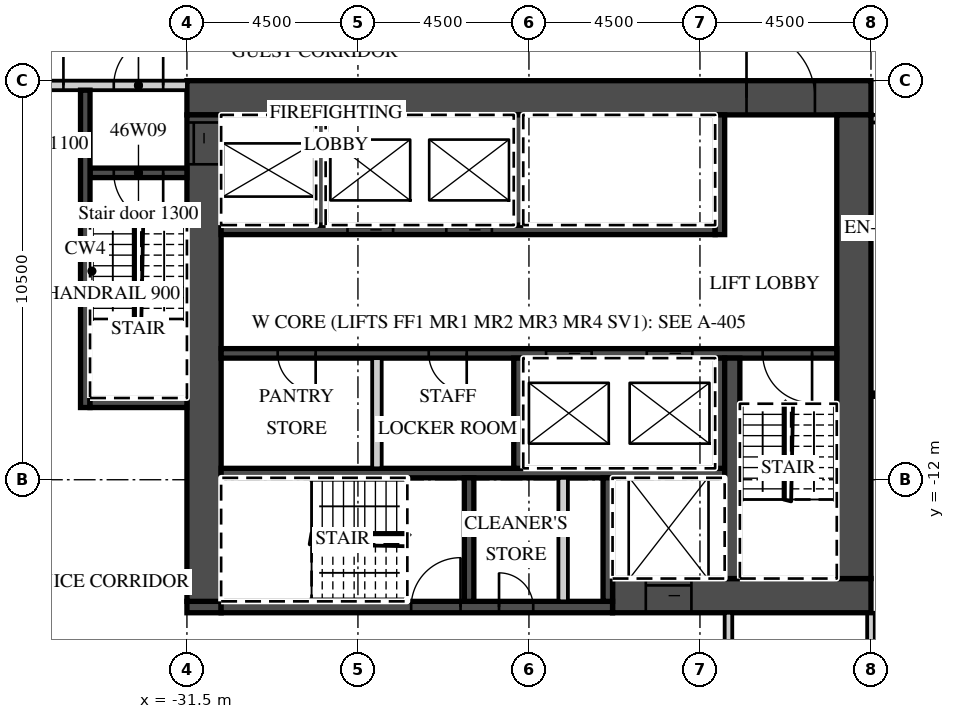
"""IFC4 building model, lengths in metres.
Left out: names, types, materials, properties, quantities, classifications, styles, units other than length and angle.
Written with IfcOpenShell. Run it as: python <this file> out.ifc"""

import sys

from ifc_helpers import new_model, si_unit, direction, frame, frame_2d, origin, place, context, subcontext, project, spatial, rectangle, extrude, element, fill, save


model = new_model("IFC4")
c1 = context("Model", 3, precision=1e-05, world=origin(), true_north=direction((0.0, 1.0)))
c2 = subcontext(c1, "Body", "Model", "MODEL_VIEW")
j1 = project(units=[si_unit("LENGTHUNIT", "METRE"), si_unit("PLANEANGLEUNIT", "RADIAN")], contexts=[c1])
p1 = place(None, origin())
s1 = spatial("IfcSite", under=j1, at=p1, CompositionType="ELEMENT")
p2 = place(p1, origin())
s2 = spatial("IfcBuilding", under=s1, at=p2, CompositionType="ELEMENT")
p3 = place(p2, frame((0.0, 0.0, 193.3)))
s3 = spatial("IfcBuildingStorey", under=s2, at=p3, CompositionType="ELEMENT", Elevation=193.3)
p4 = place(p3, frame((-13.5, -22.3, 0.0), z_axis=(0.0, 0.0, 1.0), x_axis=(0.0, 1.0, 0.0)))
e1 = element("IfcWall", 1, at=p4, inside=s3, PredefinedType="PARTITIONING", context=c2, shape_type="SweptSolid", body=[
    extrude(rectangle(XDim=6.8, YDim=0.2, at=frame_2d((3.4, 0.0))), origin(), (0.0, 0.0, 1.0), 3.02),
])
p5 = place(p3, frame((-13.5, -2.5, 0.0), z_axis=(0.0, 0.0, 1.0), x_axis=(1.0, 0.0, 0.0)))
e2 = element("IfcWall", 2, at=p5, inside=s3, PredefinedType="PARTITIONING", context=c2, shape_type="SweptSolid", body=[
    extrude(rectangle(XDim=27.0, YDim=0.2, at=frame_2d((13.5, 0.0))), origin(), (0.0, 0.0, 1.0), 3.02),
])
p6 = place(p5, frame((2.925, 0.0, 0.0)))
e3 = element("IfcOpeningElement", 3, at=p6, cuts=e2, PredefinedType="OPENING", context=c2, shape_type="SweptSolid", body=[
    extrude(rectangle(XDim=1.0, YDim=2.1, at=frame_2d((0.5, 1.05))), frame((0.0, 0.11, 0.0), z_axis=(0.0, -1.0, 0.0), x_axis=(1.0, 0.0, 0.0)), (0.0, 0.0, 1.0), 0.22),
])
p7 = place(p5, frame((5.075, 0.0, 0.0)))
e4 = element("IfcOpeningElement", 4, at=p7, cuts=e2, PredefinedType="OPENING", context=c2, shape_type="SweptSolid", body=[
    extrude(rectangle(XDim=1.0, YDim=2.1, at=frame_2d((0.5, 1.05))), frame((0.0, 0.11, 0.0), z_axis=(0.0, -1.0, 0.0), x_axis=(1.0, 0.0, 0.0)), (0.0, 0.0, 1.0), 0.22),
])
p8 = place(p5, frame((11.925, 0.0, 0.0)))
e5 = element("IfcOpeningElement", 5, at=p8, cuts=e2, PredefinedType="OPENING", context=c2, shape_type="SweptSolid", body=[
    extrude(rectangle(XDim=1.0, YDim=2.1, at=frame_2d((0.5, 1.05))), frame((0.0, 0.11, 0.0), z_axis=(0.0, -1.0, 0.0), x_axis=(1.0, 0.0, 0.0)), (0.0, 0.0, 1.0), 0.22),
])
p9 = place(p5, frame((15.938, 0.0, 0.0)))
e6 = element("IfcOpeningElement", 6, at=p9, cuts=e2, PredefinedType="OPENING", context=c2, shape_type="SweptSolid", body=[
    extrude(rectangle(XDim=1.2, YDim=2.1, at=frame_2d((0.6, 1.05))), frame((0.0, 0.11, 0.0), z_axis=(0.0, -1.0, 0.0), x_axis=(1.0, 0.0, 0.0)), (0.0, 0.0, 1.0), 0.22),
])
p10 = place(p5, frame((25.425, 0.0, 0.0)))
e7 = element("IfcOpeningElement", 7, at=p10, cuts=e2, PredefinedType="OPENING", context=c2, shape_type="SweptSolid", body=[
    extrude(rectangle(XDim=1.0, YDim=2.1, at=frame_2d((0.5, 1.05))), frame((0.0, 0.11, 0.0), z_axis=(0.0, -1.0, 0.0), x_axis=(1.0, 0.0, 0.0)), (0.0, 0.0, 1.0), 0.22),
])
p11 = place(p3, frame((-31.5, -1.95, 0.0), z_axis=(0.0, 0.0, 1.0), x_axis=(1.0, 0.0, 0.0)))
e8 = element("IfcWall", 8, at=p11, inside=s3, PredefinedType="SHEAR", context=c2, shape_type="SweptSolid", body=[
    extrude(rectangle(XDim=18.0, YDim=0.9, at=frame_2d((9.0, 0.0))), origin(), (0.0, 0.0, 1.0), 3.02),
])
p12 = place(p11, frame((14.725, 0.0, 0.0)))
e9 = element("IfcOpeningElement", 9, at=p12, cuts=e8, PredefinedType="OPENING", context=c2, shape_type="SweptSolid", body=[
    extrude(rectangle(XDim=1.8, YDim=2.1, at=frame_2d((0.9, 1.05))), frame((0.0, 0.46, 0.0), z_axis=(0.0, -1.0, 0.0), x_axis=(1.0, 0.0, 0.0)), (0.0, 0.0, 1.0), 0.92),
])
p13 = place(p3, frame((-20.3, -15.05, 0.0), z_axis=(0.0, 0.0, 1.0), x_axis=(1.0, 0.0, 0.0)))
e10 = element("IfcWall", 10, at=p13, inside=s3, PredefinedType="SHEAR", context=c2, shape_type="SweptSolid", body=[
    extrude(rectangle(XDim=6.8, YDim=0.9, at=frame_2d((3.4, 0.0))), origin(), (0.0, 0.0, 1.0), 3.02),
])
p14 = place(p13, frame((0.875, 0.0, 0.0)))
e11 = element("IfcOpeningElement", 11, at=p14, cuts=e10, PredefinedType="OPENING", context=c2, shape_type="SweptSolid", body=[
    extrude(rectangle(XDim=1.2, YDim=2.1, at=frame_2d((0.6, 1.05))), frame((0.0, 0.46, 0.0), z_axis=(0.0, -1.0, 0.0), x_axis=(1.0, 0.0, 0.0)), (0.0, 0.0, 1.0), 0.92),
])
p15 = place(p3, frame((-31.5, -15.35, 0.0), z_axis=(0.0, 0.0, 1.0), x_axis=(1.0, 0.0, 0.0)))
e12 = element("IfcWall", 12, at=p15, inside=s3, PredefinedType="SHEAR", context=c2, shape_type="SweptSolid", body=[
    extrude(rectangle(XDim=0.9, YDim=0.3, at=frame_2d((0.45, 0.0))), origin(), (0.0, 0.0, 1.0), 3.02),
])
p16 = place(p3, frame((-30.6, -15.35, 0.0), z_axis=(0.0, 0.0, 1.0), x_axis=(1.0, 0.0, 0.0)))
e13 = element("IfcWall", 13, at=p16, inside=s3, PredefinedType="SHEAR", context=c2, shape_type="SweptSolid", body=[
    extrude(rectangle(XDim=10.3, YDim=0.3, at=frame_2d((5.15, 0.0))), origin(), (0.0, 0.0, 1.0), 3.02),
])
p17 = place(p16, frame((5.0, 0.0, 0.0)))
e14 = element("IfcOpeningElement", 14, at=p17, cuts=e13, PredefinedType="OPENING", context=c2, shape_type="SweptSolid", body=[
    extrude(rectangle(XDim=1.3, YDim=2.1, at=frame_2d((0.65, 1.05))), frame((0.0, 0.16, 0.0), z_axis=(0.0, -1.0, 0.0), x_axis=(1.0, 0.0, 0.0)), (0.0, 0.0, 1.0), 0.32),
])
p18 = place(p16, frame((7.312, 0.0, 0.0)))
e15 = element("IfcOpeningElement", 15, at=p18, cuts=e13, PredefinedType="OPENING", context=c2, shape_type="SweptSolid", body=[
    extrude(rectangle(XDim=0.9, YDim=2.1, at=frame_2d((0.45, 1.05))), frame((0.0, 0.16, 0.0), z_axis=(0.0, -1.0, 0.0), x_axis=(1.0, 0.0, 0.0)), (0.0, 0.0, 1.0), 0.32),
])
p19 = place(p3, frame((-31.05, -15.2, 0.0), z_axis=(0.0, 0.0, 1.0), x_axis=(0.0, 1.0, 0.0)))
e16 = element("IfcWall", 16, at=p19, inside=s3, PredefinedType="SHEAR", context=c2, shape_type="SweptSolid", body=[
    extrude(rectangle(XDim=12.8, YDim=0.9, at=frame_2d((6.4, 0.0))), origin(), (0.0, 0.0, 1.0), 3.02),
])
p20 = place(p19, frame((11.5, 0.0, 0.0)))
e17 = element("IfcOpeningElement", 17, at=p20, cuts=e16, PredefinedType="OPENING", context=c2, shape_type="SweptSolid", body=[
    extrude(rectangle(XDim=1.1, YDim=2.1, at=frame_2d((0.55, 1.05))), frame((0.0, 0.46, 0.0), z_axis=(0.0, -1.0, 0.0), x_axis=(1.0, 0.0, 0.0)), (0.0, 0.0, 1.0), 0.92),
])
p21 = place(p3, frame((-13.95, -14.6, 0.0), z_axis=(0.0, 0.0, 1.0), x_axis=(0.0, 1.0, 0.0)))
e18 = element("IfcWall", 18, at=p21, inside=s3, PredefinedType="SHEAR", context=c2, shape_type="SweptSolid", body=[
    extrude(rectangle(XDim=12.2, YDim=0.9, at=frame_2d((6.1, 0.0))), origin(), (0.0, 0.0, 1.0), 3.02),
])
p22 = place(p3, frame((-30.6, -5.425, 0.0), z_axis=(0.0, 0.0, 1.0), x_axis=(1.0, 0.0, 0.0)))
e19 = element("IfcWall", 19, at=p22, inside=s3, PredefinedType="SHEAR", context=c2, shape_type="SweptSolid", body=[
    extrude(rectangle(XDim=13.0, YDim=0.25, at=frame_2d((6.5, 0.0))), origin(), (0.0, 0.0, 1.0), 3.02),
])
p23 = place(p22, frame((3.325, 0.0, 0.0)))
e20 = element("IfcOpeningElement", 20, at=p23, cuts=e19, PredefinedType="OPENING", context=c2, shape_type="SweptSolid", body=[
    extrude(rectangle(XDim=1.2, YDim=2.1, at=frame_2d((0.6, 1.05))), frame((0.0, 0.135, 0.0), z_axis=(0.0, -1.0, 0.0), x_axis=(1.0, 0.0, 0.0)), (0.0, 0.0, 1.0), 0.27),
])
p24 = place(p22, frame((5.925, 0.0, 0.0)))
e21 = element("IfcOpeningElement", 21, at=p24, cuts=e19, PredefinedType="OPENING", context=c2, shape_type="SweptSolid", body=[
    extrude(rectangle(XDim=1.2, YDim=2.1, at=frame_2d((0.6, 1.05))), frame((0.0, 0.135, 0.0), z_axis=(0.0, -1.0, 0.0), x_axis=(1.0, 0.0, 0.0)), (0.0, 0.0, 1.0), 0.27),
])
p25 = place(p3, frame((-17.475, -5.55, 0.0), z_axis=(0.0, 0.0, 1.0), x_axis=(0.0, 1.0, 0.0)))
e22 = element("IfcWall", 22, at=p25, inside=s3, PredefinedType="SHEAR", context=c2, shape_type="SweptSolid", body=[
    extrude(rectangle(XDim=3.15, YDim=0.25, at=frame_2d((1.575, 0.0))), origin(), (0.0, 0.0, 1.0), 3.02),
])
for number, where, z_axis, x_axis in (
    (23, (-27.975, -5.3, 0.0), (0.0, 0.0, 1.0), (0.0, 1.0, 0.0)),
    (24, (-22.775, -5.3, 0.0), (0.0, 0.0, 1.0), (0.0, 1.0, 0.0)),
):
    element("IfcWall", number, at=place(p3, frame(where, z_axis=z_axis, x_axis=x_axis)), inside=s3, PredefinedType="SHEAR", context=c2, shape_type="SweptSolid", body=[
        extrude(rectangle(XDim=2.9, YDim=0.25, at=frame_2d((1.45, 0.0))), origin(), (0.0, 0.0, 1.0), 3.02),
    ])
p26 = place(p3, frame((-30.6, -8.675, 0.0), z_axis=(0.0, 0.0, 1.0), x_axis=(1.0, 0.0, 0.0)))
e25 = element("IfcWall", 25, at=p26, inside=s3, PredefinedType="SHEAR", context=c2, shape_type="SweptSolid", body=[
    extrude(rectangle(XDim=16.2, YDim=0.25, at=frame_2d((8.1, 0.0))), origin(), (0.0, 0.0, 1.0), 3.02),
])
p27 = place(p26, frame((8.55, 0.0, 0.0)))
e26 = element("IfcOpeningElement", 26, at=p27, cuts=e25, PredefinedType="OPENING", context=c2, shape_type="SweptSolid", body=[
    extrude(rectangle(XDim=1.2, YDim=2.1, at=frame_2d((0.6, 1.05))), frame((0.0, 0.135, 0.0), z_axis=(0.0, -1.0, 0.0), x_axis=(1.0, 0.0, 0.0)), (0.0, 0.0, 1.0), 0.27),
])
p28 = place(p26, frame((11.2, 0.0, 0.0)))
e27 = element("IfcOpeningElement", 27, at=p28, cuts=e25, PredefinedType="OPENING", context=c2, shape_type="SweptSolid", body=[
    extrude(rectangle(XDim=1.2, YDim=2.1, at=frame_2d((0.6, 1.05))), frame((0.0, 0.135, 0.0), z_axis=(0.0, -1.0, 0.0), x_axis=(1.0, 0.0, 0.0)), (0.0, 0.0, 1.0), 0.27),
])
p29 = place(p26, frame((14.25, 0.0, 0.0)))
e28 = element("IfcOpeningElement", 28, at=p29, cuts=e25, PredefinedType="OPENING", context=c2, shape_type="SweptSolid", body=[
    extrude(rectangle(XDim=1.3, YDim=2.1, at=frame_2d((0.65, 1.05))), frame((0.0, 0.135, 0.0), z_axis=(0.0, -1.0, 0.0), x_axis=(1.0, 0.0, 0.0)), (0.0, 0.0, 1.0), 0.27),
])
p30 = place(p26, frame((1.488, 0.0, 0.0)))
e29 = element("IfcOpeningElement", 29, at=p30, cuts=e25, PredefinedType="OPENING", context=c2, shape_type="SweptSolid", body=[
    extrude(rectangle(XDim=1.0, YDim=2.1, at=frame_2d((0.5, 1.05))), frame((0.0, 0.135, 0.0), z_axis=(0.0, -1.0, 0.0), x_axis=(1.0, 0.0, 0.0)), (0.0, 0.0, 1.0), 0.27),
])
p31 = place(p26, frame((5.462, 0.0, 0.0)))
e30 = element("IfcOpeningElement", 30, at=p31, cuts=e25, PredefinedType="OPENING", context=c2, shape_type="SweptSolid", body=[
    extrude(rectangle(XDim=1.0, YDim=2.1, at=frame_2d((0.5, 1.05))), frame((0.0, 0.135, 0.0), z_axis=(0.0, -1.0, 0.0), x_axis=(1.0, 0.0, 0.0)), (0.0, 0.0, 1.0), 0.27),
])
p32 = place(p3, frame((-30.6, -11.825, 0.0), z_axis=(0.0, 0.0, 1.0), x_axis=(1.0, 0.0, 0.0)))
e31 = element("IfcWall", 31, at=p32, inside=s3, PredefinedType="SHEAR", context=c2, shape_type="SweptSolid", body=[
    extrude(rectangle(XDim=13.25, YDim=0.25, at=frame_2d((6.625, 0.0))), origin(), (0.0, 0.0, 1.0), 3.02),
])
for number, where, z_axis, x_axis in (
    (32, (-17.475, -11.7, 0.0), (0.0, 0.0, 1.0), (0.0, 1.0, 0.0)),
    (33, (-22.775, -11.7, 0.0), (0.0, 0.0, 1.0), (0.0, 1.0, 0.0)),
):
    element("IfcWall", number, at=place(p3, frame(where, z_axis=z_axis, x_axis=x_axis)), inside=s3, PredefinedType="SHEAR", context=c2, shape_type="SweptSolid", body=[
        extrude(rectangle(XDim=2.9, YDim=0.25, at=frame_2d((1.45, 0.0))), origin(), (0.0, 0.0, 1.0), 3.02),
    ])
p33 = place(p3, frame((-26.5, -11.7, 0.0), z_axis=(0.0, 0.0, 1.0), x_axis=(0.0, 1.0, 0.0)))
e34 = element("IfcWall", 34, at=p33, inside=s3, PredefinedType="PARTITIONING", context=c2, shape_type="SweptSolid", body=[
    extrude(rectangle(XDim=2.9, YDim=0.25, at=frame_2d((1.45, 0.0))), origin(), (0.0, 0.0, 1.0), 3.02),
])
p34 = place(p3, frame((-17.15, -14.6, 0.0), z_axis=(0.0, 0.0, 1.0), x_axis=(0.0, 1.0, 0.0)))
e35 = element("IfcWall", 35, at=p34, inside=s3, PredefinedType="SHEAR", context=c2, shape_type="SweptSolid", body=[
    extrude(rectangle(XDim=5.8, YDim=0.4, at=frame_2d((2.9, 0.0))), origin(), (0.0, 0.0, 1.0), 3.02),
])
for number, where, z_axis, x_axis in (
    (36, (-20.425, -15.2, 0.0), (0.0, 0.0, 1.0), (0.0, 1.0, 0.0)),
    (37, (-24.075, -15.2, 0.0), (0.0, 0.0, 1.0), (0.0, 1.0, 0.0)),
):
    element("IfcWall", number, at=place(p3, frame(where, z_axis=z_axis, x_axis=x_axis)), inside=s3, PredefinedType="SHEAR", context=c2, shape_type="SweptSolid", body=[
        extrude(rectangle(XDim=3.25, YDim=0.25, at=frame_2d((1.625, 0.0))), origin(), (0.0, 0.0, 1.0), 3.02),
    ])
p35 = place(p3, frame((-21.6, -15.2, 0.0), z_axis=(0.0, 0.0, 1.0), x_axis=(0.0, 1.0, 0.0)))
e38 = element("IfcWall", 38, at=p35, inside=s3, PredefinedType="PARTITIONING", context=c2, shape_type="SweptSolid", body=[
    extrude(rectangle(XDim=3.25, YDim=0.25, at=frame_2d((1.625, 0.0))), origin(), (0.0, 0.0, 1.0), 3.02),
])
p36 = place(p3, frame((-42.632, -1.625, 0.0), z_axis=(0.0, 0.0, 1.0), x_axis=(1.0, 0.0, 0.0)))
e39 = element("IfcWall", 39, at=p36, inside=s3, PredefinedType="PARTITIONING", context=c2, shape_type="SweptSolid", body=[
    extrude(rectangle(XDim=11.132, YDim=0.25, at=frame_2d((5.566, 0.0))), origin(), (0.0, 0.0, 1.0), 3.02),
])
p37 = place(p36, frame((9.207, 0.0, 0.0)))
e40 = element("IfcOpeningElement", 40, at=p37, cuts=e39, PredefinedType="OPENING", context=c2, shape_type="SweptSolid", body=[
    extrude(rectangle(XDim=1.3, YDim=2.1, at=frame_2d((0.65, 1.05))), frame((0.0, 0.135, 0.0), z_axis=(0.0, -1.0, 0.0), x_axis=(1.0, 0.0, 0.0)), (0.0, 0.0, 1.0), 0.27),
])
p38 = place(p36, frame((6.781, 0.0, 0.0)))
e41 = element("IfcOpeningElement", 41, at=p38, cuts=e39, PredefinedType="OPENING", context=c2, shape_type="SweptSolid", body=[
    extrude(rectangle(XDim=1.1, YDim=2.1, at=frame_2d((0.55, 1.05))), frame((0.0, 0.135, 0.0), z_axis=(0.0, -1.0, 0.0), x_axis=(1.0, 0.0, 0.0)), (0.0, 0.0, 1.0), 0.27),
])
p39 = place(p3, frame((-34.05, -3.925, 0.0), z_axis=(0.0, 0.0, 1.0), x_axis=(1.0, 0.0, 0.0)))
e42 = element("IfcWall", 42, at=p39, inside=s3, PredefinedType="SHEAR", context=c2, shape_type="SweptSolid", body=[
    extrude(rectangle(XDim=2.55, YDim=0.25, at=frame_2d((1.275, 0.0))), origin(), (0.0, 0.0, 1.0), 3.02),
])
p40 = place(p39, frame((0.625, 0.0, 0.0)))
e43 = element("IfcOpeningElement", 43, at=p40, cuts=e42, PredefinedType="OPENING", context=c2, shape_type="SweptSolid", body=[
    extrude(rectangle(XDim=1.3, YDim=2.1, at=frame_2d((0.65, 1.05))), frame((0.0, 0.135, 0.0), z_axis=(0.0, -1.0, 0.0), x_axis=(1.0, 0.0, 0.0)), (0.0, 0.0, 1.0), 0.27),
])
p41 = place(p3, frame((-34.175, -10.1, 0.0), z_axis=(0.0, 0.0, 1.0), x_axis=(0.0, 1.0, 0.0)))
e44 = element("IfcWall", 44, at=p41, inside=s3, PredefinedType="SHEAR", context=c2, shape_type="SweptSolid", body=[
    extrude(rectangle(XDim=8.35, YDim=0.25, at=frame_2d((4.175, 0.0))), origin(), (0.0, 0.0, 1.0), 3.02),
])
p42 = place(p3, frame((-34.05, -9.975, 0.0), z_axis=(0.0, 0.0, 1.0), x_axis=(1.0, 0.0, 0.0)))
e45 = element("IfcWall", 45, at=p42, inside=s3, PredefinedType="SHEAR", context=c2, shape_type="SweptSolid", body=[
    extrude(rectangle(XDim=2.55, YDim=0.25, at=frame_2d((1.275, 0.0))), origin(), (0.0, 0.0, 1.0), 3.02),
])
p43 = place(p3, frame((-17.25, -17.7, 0.0), z_axis=(0.0, 0.0, 1.0), x_axis=(0.0, 1.0, 0.0)))
e46 = element("IfcWall", 46, at=p43, inside=s3, PredefinedType="PARTITIONING", context=c2, shape_type="SweptSolid", body=[
    extrude(rectangle(XDim=2.2, YDim=0.2, at=frame_2d((1.1, 0.0))), origin(), (0.0, 0.0, 1.0), 3.02),
])
p44 = place(p27, origin())
e47 = element("IfcDoor", 47, at=p44, inside=s3, OperationType="SLIDING_TO_LEFT", PredefinedType="DOOR", context=c2, shape_type="SweptSolid", body=[
    extrude(rectangle(XDim=1.2, YDim=2.1, at=frame_2d((0.6, 1.05))), frame((0.0, 0.025, 0.0), z_axis=(0.0, -1.0, 0.0), x_axis=(1.0, 0.0, 0.0)), (0.0, 0.0, 1.0), 0.05),
])
fill(e26, e47)
p45 = place(p28, origin())
e48 = element("IfcDoor", 48, at=p45, inside=s3, OperationType="SLIDING_TO_RIGHT", PredefinedType="DOOR", context=c2, shape_type="SweptSolid", body=[
    extrude(rectangle(XDim=1.2, YDim=2.1, at=frame_2d((0.6, 1.05))), frame((0.0, 0.025, 0.0), z_axis=(0.0, -1.0, 0.0), x_axis=(1.0, 0.0, 0.0)), (0.0, 0.0, 1.0), 0.05),
])
fill(e27, e48)
p46 = place(p23, origin())
e49 = element("IfcDoor", 49, at=p46, inside=s3, OperationType="SLIDING_TO_RIGHT", PredefinedType="DOOR", context=c2, shape_type="SweptSolid", body=[
    extrude(rectangle(XDim=1.2, YDim=2.1, at=frame_2d((0.6, 1.05))), frame((0.0, 0.025, 0.0), z_axis=(0.0, -1.0, 0.0), x_axis=(1.0, 0.0, 0.0)), (0.0, 0.0, 1.0), 0.05),
])
fill(e20, e49)
p47 = place(p24, origin())
e50 = element("IfcDoor", 50, at=p47, inside=s3, OperationType="SLIDING_TO_RIGHT", PredefinedType="DOOR", context=c2, shape_type="SweptSolid", body=[
    extrude(rectangle(XDim=1.2, YDim=2.1, at=frame_2d((0.6, 1.05))), frame((0.0, 0.025, 0.0), z_axis=(0.0, -1.0, 0.0), x_axis=(1.0, 0.0, 0.0)), (0.0, 0.0, 1.0), 0.05),
])
fill(e21, e50)
p48 = place(p14, origin())
e51 = element("IfcDoor", 51, at=p48, inside=s3, OperationType="SLIDING_TO_LEFT", PredefinedType="DOOR", context=c2, shape_type="SweptSolid", body=[
    extrude(rectangle(XDim=1.2, YDim=2.1, at=frame_2d((0.6, 1.05))), frame((0.0, 0.025, 0.0), z_axis=(0.0, -1.0, 0.0), x_axis=(1.0, 0.0, 0.0)), (0.0, 0.0, 1.0), 0.05),
])
fill(e11, e51)
p49 = place(p20, origin())
e52 = element("IfcDoor", 52, at=p49, inside=s3, OperationType="SLIDING_TO_RIGHT", PredefinedType="DOOR", context=c2, shape_type="SweptSolid", body=[
    extrude(rectangle(XDim=1.1, YDim=2.1, at=frame_2d((0.55, 1.05))), frame((0.0, 0.025, 0.0), z_axis=(0.0, -1.0, 0.0), x_axis=(1.0, 0.0, 0.0)), (0.0, 0.0, 1.0), 0.05),
])
fill(e17, e52)
p50 = place(p12, origin())
e53 = element("IfcDoor", 53, at=p50, inside=s3, OperationType="DOUBLE_DOOR_DOUBLE_SWING", PredefinedType="DOOR", context=c2, shape_type="SweptSolid", body=[
    extrude(rectangle(XDim=1.8, YDim=2.1, at=frame_2d((0.9, 1.05))), frame((0.0, 0.025, 0.0), z_axis=(0.0, -1.0, 0.0), x_axis=(1.0, 0.0, 0.0)), (0.0, 0.0, 1.0), 0.05),
])
fill(e9, e53)
p51 = place(p37, origin())
e54 = element("IfcDoor", 54, at=p51, inside=s3, OperationType="SINGLE_SWING_RIGHT", PredefinedType="DOOR", context=c2, shape_type="SweptSolid", body=[
    extrude(rectangle(XDim=1.3, YDim=2.1, at=frame_2d((0.65, 1.05))), frame((0.0, 0.025, 0.0), z_axis=(0.0, -1.0, 0.0), x_axis=(1.0, 0.0, 0.0)), (0.0, 0.0, 1.0), 0.05),
])
fill(e40, e54)
p52 = place(p40, origin())
e55 = element("IfcDoor", 55, at=p52, inside=s3, OperationType="SINGLE_SWING_RIGHT", PredefinedType="DOOR", context=c2, shape_type="SweptSolid", body=[
    extrude(rectangle(XDim=1.3, YDim=2.1, at=frame_2d((0.65, 1.05))), frame((0.0, 0.025, 0.0), z_axis=(0.0, -1.0, 0.0), x_axis=(1.0, 0.0, 0.0)), (0.0, 0.0, 1.0), 0.05),
])
fill(e43, e55)
p53 = place(p38, origin())
e56 = element("IfcDoor", 56, at=p53, inside=s3, OperationType="SINGLE_SWING_RIGHT", PredefinedType="DOOR", context=c2, shape_type="SweptSolid", body=[
    extrude(rectangle(XDim=1.1, YDim=2.1, at=frame_2d((0.55, 1.05))), frame((0.0, 0.025, 0.0), z_axis=(0.0, -1.0, 0.0), x_axis=(1.0, 0.0, 0.0)), (0.0, 0.0, 1.0), 0.05),
])
fill(e41, e56)
p54 = place(p29, origin())
e57 = element("IfcDoor", 57, at=p54, inside=s3, OperationType="SINGLE_SWING_RIGHT", PredefinedType="DOOR", context=c2, shape_type="SweptSolid", body=[
    extrude(rectangle(XDim=1.3, YDim=2.1, at=frame_2d((0.65, 1.05))), frame((0.0, 0.025, 0.0), z_axis=(0.0, -1.0, 0.0), x_axis=(1.0, 0.0, 0.0)), (0.0, 0.0, 1.0), 0.05),
])
fill(e28, e57)
p55 = place(p17, origin())
e58 = element("IfcDoor", 58, at=p55, inside=s3, OperationType="SINGLE_SWING_RIGHT", PredefinedType="DOOR", context=c2, shape_type="SweptSolid", body=[
    extrude(rectangle(XDim=1.3, YDim=2.1, at=frame_2d((0.65, 1.05))), frame((0.0, 0.025, 0.0), z_axis=(0.0, -1.0, 0.0), x_axis=(1.0, 0.0, 0.0)), (0.0, 0.0, 1.0), 0.05),
])
fill(e14, e58)
p56 = place(p18, origin())
e59 = element("IfcDoor", 59, at=p56, inside=s3, OperationType="SINGLE_SWING_LEFT", PredefinedType="DOOR", context=c2, shape_type="SweptSolid", body=[
    extrude(rectangle(XDim=0.9, YDim=2.1, at=frame_2d((0.45, 1.05))), frame((0.0, 0.025, 0.0), z_axis=(0.0, -1.0, 0.0), x_axis=(1.0, 0.0, 0.0)), (0.0, 0.0, 1.0), 0.05),
])
fill(e15, e59)
p57 = place(p30, origin())
e60 = element("IfcDoor", 60, at=p57, inside=s3, OperationType="SINGLE_SWING_RIGHT", PredefinedType="DOOR", context=c2, shape_type="SweptSolid", body=[
    extrude(rectangle(XDim=1.0, YDim=2.1, at=frame_2d((0.5, 1.05))), frame((0.0, 0.025, 0.0), z_axis=(0.0, -1.0, 0.0), x_axis=(1.0, 0.0, 0.0)), (0.0, 0.0, 1.0), 0.05),
])
fill(e29, e60)
p58 = place(p31, origin())
e61 = element("IfcDoor", 61, at=p58, inside=s3, OperationType="SINGLE_SWING_RIGHT", PredefinedType="DOOR", context=c2, shape_type="SweptSolid", body=[
    extrude(rectangle(XDim=1.0, YDim=2.1, at=frame_2d((0.5, 1.05))), frame((0.0, 0.025, 0.0), z_axis=(0.0, -1.0, 0.0), x_axis=(1.0, 0.0, 0.0)), (0.0, 0.0, 1.0), 0.05),
])
fill(e30, e61)
save(model, sys.argv[1])
